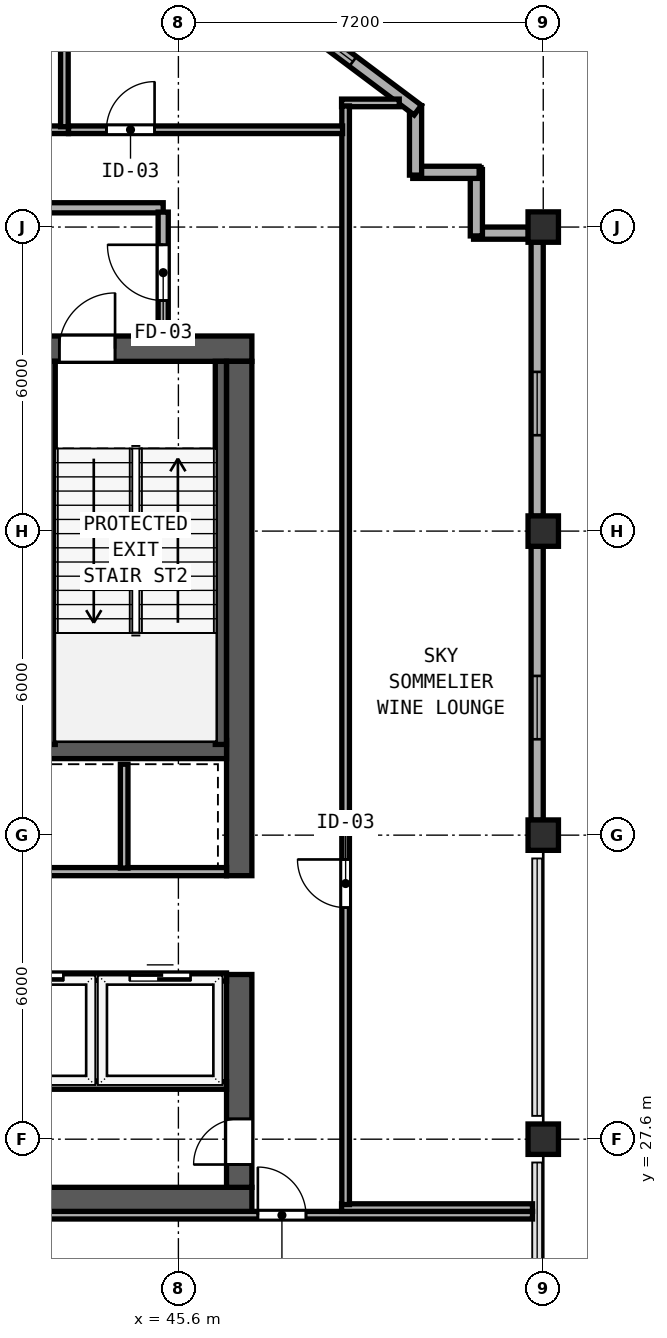
"""IFC4 building model, lengths in metres.
Left out: names, types, materials, properties, quantities, classifications, styles, units other than length and angle.
Written with IfcOpenShell. Run it as: python <this file> out.ifc"""

import sys

from ifc_helpers import new_model, si_unit, direction, frame, frame_2d, origin, origin_2d, place, context, subcontext, project, spatial, rectangle, hollow_rectangle, extrude, element, fill, save


model = new_model("IFC4")
c1 = context("Model", 3, precision=1e-05, world=origin(), true_north=direction((0.0, 1.0)))
c2 = subcontext(c1, "Body", "Model", "MODEL_VIEW")
j1 = project(units=[si_unit("LENGTHUNIT", "METRE"), si_unit("PLANEANGLEUNIT", "RADIAN")], contexts=[c1])
p1 = place(None, origin())
s1 = spatial("IfcSite", under=j1, at=p1, CompositionType="ELEMENT")
p2 = place(p1, origin())
s2 = spatial("IfcBuilding", under=s1, at=p2, CompositionType="ELEMENT")
p3 = place(p2, frame((0.0, 0.0, 313.4)))
s3 = spatial("IfcBuildingStorey", under=s2, at=p3, CompositionType="ELEMENT", Elevation=313.4)
p4 = place(p3, frame((29.75, 26.4, 0.0), z_axis=(0.0, 0.0, 1.0), x_axis=(1.0, 0.0, 0.0)))
e1 = element("IfcWall", 1, at=p4, inside=s3, PredefinedType="SHEAR", context=c2, shape_type="SweptSolid", body=[
    extrude(rectangle(XDim=17.3, YDim=0.5, at=frame_2d((8.65, 0.0))), origin(), (0.0, 0.0, 1.0), 4.56),
])
p5 = place(p3, frame((29.75, 43.2, 0.0), z_axis=(0.0, 0.0, 1.0), x_axis=(1.0, 0.0, 0.0)))
e2 = element("IfcWall", 2, at=p5, inside=s3, PredefinedType="SHEAR", context=c2, shape_type="SweptSolid", body=[
    extrude(rectangle(XDim=17.3, YDim=0.5, at=frame_2d((8.65, 0.0))), origin(), (0.0, 0.0, 1.0), 4.56),
])
p6 = place(p5, frame((2.3, 0.0, 0.0)))
e3 = element("IfcOpeningElement", 3, at=p6, cuts=e2, PredefinedType="OPENING", context=c2, shape_type="SweptSolid", body=[
    extrude(rectangle(XDim=1.1, YDim=2.15, at=frame_2d((0.55, 1.075))), frame((0.0, 0.26, 0.0), z_axis=(0.0, -1.0, 0.0), x_axis=(1.0, 0.0, 0.0)), (0.0, 0.0, 1.0), 0.52),
])
p7 = place(p5, frame((7.41, 0.0, 0.0)))
e4 = element("IfcOpeningElement", 4, at=p7, cuts=e2, PredefinedType="OPENING", context=c2, shape_type="SweptSolid", body=[
    extrude(rectangle(XDim=1.1, YDim=2.15, at=frame_2d((0.55, 1.075))), frame((0.0, 0.26, 0.0), z_axis=(0.0, -1.0, 0.0), x_axis=(1.0, 0.0, 0.0)), (0.0, 0.0, 1.0), 0.52),
])
p8 = place(p5, frame((13.5, 0.0, 0.0)))
e5 = element("IfcOpeningElement", 5, at=p8, cuts=e2, PredefinedType="OPENING", context=c2, shape_type="SweptSolid", body=[
    extrude(rectangle(XDim=1.1, YDim=2.15, at=frame_2d((0.55, 1.075))), frame((0.0, 0.26, 0.0), z_axis=(0.0, -1.0, 0.0), x_axis=(1.0, 0.0, 0.0)), (0.0, 0.0, 1.0), 0.52),
])
p9 = place(p5, frame((4.63, 0.0, 0.0)))
e6 = element("IfcOpeningElement", 6, at=p9, cuts=e2, PredefinedType="OPENING", context=c2, shape_type="SweptSolid", body=[
    extrude(rectangle(XDim=1.1, YDim=2.2, at=frame_2d((0.55, 1.1))), frame((0.0, 0.26, 0.0), z_axis=(0.0, -1.0, 0.0), x_axis=(1.0, 0.0, 0.0)), (0.0, 0.0, 1.0), 0.52),
])
p10 = place(p5, frame((10.99, 0.0, 0.0)))
e7 = element("IfcOpeningElement", 7, at=p10, cuts=e2, PredefinedType="OPENING", context=c2, shape_type="SweptSolid", body=[
    extrude(rectangle(XDim=1.1, YDim=2.2, at=frame_2d((0.55, 1.1))), frame((0.0, 0.26, 0.0), z_axis=(0.0, -1.0, 0.0), x_axis=(1.0, 0.0, 0.0)), (0.0, 0.0, 1.0), 0.52),
])
p11 = place(p3, frame((46.8, 26.65, 0.0), z_axis=(0.0, 0.0, 1.0), x_axis=(0.0, 1.0, 0.0)))
e8 = element("IfcWall", 8, at=p11, inside=s3, PredefinedType="SHEAR", context=c2, shape_type="SweptSolid", body=[
    extrude(rectangle(XDim=4.2, YDim=0.5, at=frame_2d((2.1, 0.0))), origin(), (0.0, 0.0, 1.0), 4.56),
])
p12 = place(p11, frame((1.35, 0.0, 0.0), z_axis=(0.0, 0.0, 1.0), x_axis=(-1.0, 0.0, 0.0)))
e9 = element("IfcOpeningElement", 9, at=p12, cuts=e8, PredefinedType="OPENING", context=c2, shape_type="SweptSolid", body=[
    extrude(rectangle(XDim=0.9, YDim=2.1, at=frame_2d((0.45, 1.05))), frame((0.0, 0.26, 0.0), z_axis=(0.0, -1.0, 0.0), x_axis=(1.0, 0.0, 0.0)), (0.0, 0.0, 1.0), 0.52),
])
p13 = place(p3, frame((46.8, 32.8, 0.0), z_axis=(0.0, 0.0, 1.0), x_axis=(0.0, 1.0, 0.0)))
e10 = element("IfcWall", 10, at=p13, inside=s3, PredefinedType="SHEAR", context=c2, shape_type="SweptSolid", body=[
    extrude(rectangle(XDim=10.15, YDim=0.5, at=frame_2d((5.075, 0.0))), origin(), (0.0, 0.0, 1.0), 4.56),
])
p14 = place(p3, frame((30.25, 35.29, 0.0), z_axis=(0.0, 0.0, 1.0), x_axis=(1.0, 0.0, 0.0)))
e11 = element("IfcWall", 11, at=p14, inside=s3, PredefinedType="SHEAR", context=c2, shape_type="SweptSolid", body=[
    extrude(rectangle(XDim=16.3, YDim=0.36, at=frame_2d((8.15, 0.0))), origin(), (0.0, 0.0, 1.0), 4.56),
])
p15 = place(p14, frame((5.1, 0.0, 0.0), z_axis=(0.0, 0.0, 1.0), x_axis=(-1.0, 0.0, 0.0)))
e12 = element("IfcOpeningElement", 12, at=p15, cuts=e11, PredefinedType="OPENING", context=c2, shape_type="SweptSolid", body=[
    extrude(rectangle(XDim=0.9, YDim=2.1, at=frame_2d((0.45, 1.05))), frame((0.0, 0.19, 0.0), z_axis=(0.0, -1.0, 0.0), x_axis=(1.0, 0.0, 0.0)), (0.0, 0.0, 1.0), 0.38),
])
p16 = place(p14, frame((12.16, 0.0, 0.0), z_axis=(0.0, 0.0, 1.0), x_axis=(-1.0, 0.0, 0.0)))
e13 = element("IfcOpeningElement", 13, at=p16, cuts=e11, PredefinedType="OPENING", context=c2, shape_type="SweptSolid", body=[
    extrude(rectangle(XDim=0.9, YDim=2.1, at=frame_2d((0.45, 1.05))), frame((0.0, 0.19, 0.0), z_axis=(0.0, -1.0, 0.0), x_axis=(1.0, 0.0, 0.0)), (0.0, 0.0, 1.0), 0.38),
])
for number, where, z_axis, x_axis in (
    (14, (43.06, 35.39, 0.0), (0.0, 0.0, 1.0), (0.0, 1.0, 0.0)),
    (15, (46.438, 35.39, 0.0), (0.0, 0.0, 1.0), (0.0, 1.0, 0.0)),
):
    element("IfcWall", number, at=place(p3, frame(where, z_axis=z_axis, x_axis=x_axis)), inside=s3, PredefinedType="SHEAR", context=c2, shape_type="SweptSolid", body=[
        extrude(rectangle(XDim=7.56, YDim=0.22, at=frame_2d((3.78, 0.0))), origin(), (0.0, 0.0, 1.0), 4.56),
    ])
for number, where, z_axis, x_axis in (
    (16, (52.8, 33.6, 0.0), (0.0, 0.0, 1.0), (1.0, 0.0, 0.0)),
    (17, (52.8, 45.6, 0.0), (0.0, 0.0, 1.0), (1.0, 0.0, 0.0)),
    (18, (52.8, 27.6, 0.0), (0.0, 0.0, 1.0), (1.0, 0.0, 0.0)),
    (19, (52.8, 39.6, 0.0), (0.0, 0.0, 1.0), (1.0, 0.0, 0.0)),
):
    element("IfcColumn", number, at=place(p3, frame(where, z_axis=z_axis, x_axis=x_axis)), inside=s3, PredefinedType="COLUMN", context=c2, shape_type="SweptSolid", body=[
        extrude(hollow_rectangle(XDim=0.6, YDim=0.6, WallThickness=0.024, at=origin_2d()), origin(), (0.0, 0.0, 1.0), 4.8),
    ])
p17 = place(p3, frame((52.68, 33.892, 0.0), z_axis=(0.0, 0.0, 1.0), x_axis=(0.0, 1.0, 0.0)))
e20 = element("IfcWall", 20, at=p17, inside=s3, PredefinedType="SOLIDWALL", context=c2, shape_type="SweptSolid", body=[
    extrude(rectangle(XDim=5.416, YDim=0.24, at=frame_2d((2.708, 0.0))), origin(), (0.0, 0.0, 1.0), 4.155),
])
p18 = place(p17, frame((1.6, 0.0, 0.85)))
e21 = element("IfcOpeningElement", 21, at=p18, cuts=e20, PredefinedType="OPENING", context=c2, shape_type="SweptSolid", body=[
    extrude(rectangle(XDim=1.25, YDim=1.95, at=frame_2d((0.625, 0.975))), frame((0.0, 0.13, 0.0), z_axis=(0.0, -1.0, 0.0), x_axis=(1.0, 0.0, 0.0)), (0.0, 0.0, 1.0), 0.26),
])
p19 = place(p3, frame((52.68, 39.892, 0.0), z_axis=(0.0, 0.0, 1.0), x_axis=(0.0, 1.0, 0.0)))
e22 = element("IfcWall", 22, at=p19, inside=s3, PredefinedType="SOLIDWALL", context=c2, shape_type="SweptSolid", body=[
    extrude(rectangle(XDim=5.416, YDim=0.24, at=frame_2d((2.708, 0.0))), origin(), (0.0, 0.0, 1.0), 4.155),
])
p20 = place(p19, frame((1.6, 0.0, 0.85)))
e23 = element("IfcOpeningElement", 23, at=p20, cuts=e22, PredefinedType="OPENING", context=c2, shape_type="SweptSolid", body=[
    extrude(rectangle(XDim=1.25, YDim=1.95, at=frame_2d((0.625, 0.975))), frame((0.0, 0.13, 0.0), z_axis=(0.0, -1.0, 0.0), x_axis=(1.0, 0.0, 0.0)), (0.0, 0.0, 1.0), 0.26),
])
p21 = place(p3, frame((52.508, 45.48, 0.0), z_axis=(0.0, 0.0, 1.0), x_axis=(-1.0, 0.0, 0.0)))
e24 = element("IfcWall", 24, at=p21, inside=s3, PredefinedType="SOLIDWALL", context=c2, shape_type="SweptSolid", body=[
    extrude(rectangle(XDim=1.083, YDim=0.24, at=frame_2d((0.542, 0.0))), origin(), (0.0, 0.0, 1.0), 4.56),
])
p22 = place(p3, frame((51.48, 45.425, 0.0), z_axis=(0.0, 0.0, 1.0), x_axis=(0.0, 1.0, 0.0)))
e25 = element("IfcWall", 25, at=p22, inside=s3, PredefinedType="SOLIDWALL", context=c2, shape_type="SweptSolid", body=[
    extrude(rectangle(XDim=1.31, YDim=0.24, at=frame_2d((0.655, 0.0))), origin(), (0.0, 0.0, 1.0), 4.56),
])
p23 = place(p3, frame((51.535, 46.68, 0.0), z_axis=(0.0, 0.0, 1.0), x_axis=(-1.0, 0.0, 0.0)))
e26 = element("IfcWall", 26, at=p23, inside=s3, PredefinedType="SOLIDWALL", context=c2, shape_type="SweptSolid", body=[
    extrude(rectangle(XDim=1.31, YDim=0.24, at=frame_2d((0.655, 0.0))), origin(), (0.0, 0.0, 1.0), 4.56),
])
p24 = place(p3, frame((50.28, 46.625, 0.0), z_axis=(0.0, 0.0, 1.0), x_axis=(0.0, 1.0, 0.0)))
e27 = element("IfcWall", 27, at=p24, inside=s3, PredefinedType="SOLIDWALL", context=c2, shape_type="SweptSolid", body=[
    extrude(rectangle(XDim=1.37, YDim=0.24, at=frame_2d((0.685, 0.0))), origin(), (0.0, 0.0, 1.0), 4.56),
])
p25 = place(p3, frame((50.324, 47.907, 0.0), z_axis=(0.0, 0.0, 1.0), x_axis=(-0.80001459783, 0.599980535734, 0.0)))
e28 = element("IfcWall", 28, at=p25, inside=s3, PredefinedType="SOLIDWALL", context=c2, shape_type="SweptSolid", body=[
    extrude(rectangle(XDim=6.021, YDim=0.24, at=frame_2d((3.01, 0.0))), origin(), (0.0, 0.0, 1.0), 4.56),
])
p26 = place(p25, frame((1.6, 0.0, 0.85)))
e29 = element("IfcOpeningElement", 29, at=p26, cuts=e28, PredefinedType="OPENING", context=c2, shape_type="SweptSolid", body=[
    extrude(rectangle(XDim=1.25, YDim=1.95, at=frame_2d((0.625, 0.975))), frame((0.0, 0.13, 0.0), z_axis=(0.0, -1.0, 0.0), x_axis=(1.0, 0.0, 0.0)), (0.0, 0.0, 1.0), 0.26),
])
p27 = place(p3, frame((31.5, 45.98, 0.0), z_axis=(0.0, 0.0, 1.0), x_axis=(1.0, 0.0, 0.0)))
e30 = element("IfcWall", 30, at=p27, inside=s3, PredefinedType="SOLIDWALL", context=c2, shape_type="SweptSolid", body=[
    extrude(rectangle(XDim=13.8, YDim=0.2, at=frame_2d((6.9, 0.0))), origin(), (0.0, 0.0, 1.0), 4.56),
])
p28 = place(p3, frame((45.3, 43.45, 0.0), z_axis=(0.0, 0.0, 1.0), x_axis=(0.0, 1.0, 0.0)))
e31 = element("IfcWall", 31, at=p28, inside=s3, PredefinedType="SOLIDWALL", context=c2, shape_type="SweptSolid", body=[
    extrude(rectangle(XDim=2.445, YDim=0.2, at=frame_2d((1.223, 0.0))), origin(), (0.0, 0.0, 1.0), 4.56),
])
p29 = place(p28, frame((0.7, 0.0, 0.0)))
e32 = element("IfcOpeningElement", 32, at=p29, cuts=e31, PredefinedType="OPENING", context=c2, shape_type="SweptSolid", body=[
    extrude(rectangle(XDim=1.1, YDim=2.15, at=frame_2d((0.55, 1.075))), frame((0.0, 0.11, 0.0), z_axis=(0.0, -1.0, 0.0), x_axis=(1.0, 0.0, 0.0)), (0.0, 0.0, 1.0), 0.22),
])
p30 = place(p3, frame((42.63, 32.88, 0.0), z_axis=(0.0, 0.0, 1.0), x_axis=(1.0, 0.0, 0.0)))
e33 = element("IfcWall", 33, at=p30, inside=s3, PredefinedType="SOLIDWALL", context=c2, shape_type="SweptSolid", body=[
    extrude(rectangle(XDim=3.92, YDim=0.16, at=frame_2d((1.96, 0.0))), origin(), (0.0, 0.0, 1.0), 4.56),
])
p31 = place(p3, frame((44.53, 32.95, 0.0), z_axis=(0.0, 0.0, 1.0), x_axis=(0.0, 1.0, 0.0)))
e34 = element("IfcWall", 34, at=p31, inside=s3, PredefinedType="SOLIDWALL", context=c2, shape_type="SweptSolid", body=[
    extrude(rectangle(XDim=2.05, YDim=0.15, at=frame_2d((1.025, 0.0))), origin(), (0.0, 0.0, 1.0), 4.56),
])
p32 = place(p3, frame((30.25, 30.8, 0.0), z_axis=(0.0, 0.0, 1.0), x_axis=(1.0, 0.0, 0.0)))
e35 = element("IfcWall", 35, at=p32, inside=s3, PredefinedType="SOLIDWALL", context=c2, shape_type="SweptSolid", body=[
    extrude(rectangle(XDim=16.3, YDim=0.16, at=frame_2d((8.15, 0.0))), origin(), (0.0, 0.0, 1.0), 4.56),
])
p33 = place(p32, frame((0.9, 0.0, 0.0)))
e36 = element("IfcOpeningElement", 36, at=p33, cuts=e35, PredefinedType="OPENING", context=c2, shape_type="SweptSolid", body=[
    extrude(rectangle(XDim=0.95, YDim=2.12, at=frame_2d((0.475, 1.06))), frame((0.0, 0.09, 0.0), z_axis=(0.0, -1.0, 0.0), x_axis=(1.0, 0.0, 0.0)), (0.0, 0.0, 1.0), 0.18),
])
p34 = place(p32, frame((3.85, 0.0, 0.0)))
e37 = element("IfcOpeningElement", 37, at=p34, cuts=e35, PredefinedType="OPENING", context=c2, shape_type="SweptSolid", body=[
    extrude(rectangle(XDim=0.95, YDim=2.12, at=frame_2d((0.475, 1.06))), frame((0.0, 0.09, 0.0), z_axis=(0.0, -1.0, 0.0), x_axis=(1.0, 0.0, 0.0)), (0.0, 0.0, 1.0), 0.18),
])
p35 = place(p32, frame((9.37, 0.0, 0.0)))
e38 = element("IfcOpeningElement", 38, at=p35, cuts=e35, PredefinedType="OPENING", context=c2, shape_type="SweptSolid", body=[
    extrude(rectangle(XDim=1.2, YDim=2.2, at=frame_2d((0.6, 1.1))), frame((0.0, 0.09, 0.0), z_axis=(0.0, -1.0, 0.0), x_axis=(1.0, 0.0, 0.0)), (0.0, 0.0, 1.0), 0.18),
])
p36 = place(p32, frame((11.88, 0.0, 0.0)))
e39 = element("IfcOpeningElement", 39, at=p36, cuts=e35, PredefinedType="OPENING", context=c2, shape_type="SweptSolid", body=[
    extrude(rectangle(XDim=1.2, YDim=2.2, at=frame_2d((0.6, 1.1))), frame((0.0, 0.09, 0.0), z_axis=(0.0, -1.0, 0.0), x_axis=(1.0, 0.0, 0.0)), (0.0, 0.0, 1.0), 0.18),
])
p37 = place(p32, frame((14.39, 0.0, 0.0)))
e40 = element("IfcOpeningElement", 40, at=p37, cuts=e35, PredefinedType="OPENING", context=c2, shape_type="SweptSolid", body=[
    extrude(rectangle(XDim=1.2, YDim=2.2, at=frame_2d((0.6, 1.1))), frame((0.0, 0.09, 0.0), z_axis=(0.0, -1.0, 0.0), x_axis=(1.0, 0.0, 0.0)), (0.0, 0.0, 1.0), 0.18),
])
p38 = place(p3, frame((38.86, 28.66, 0.0), z_axis=(0.0, 0.0, 1.0), x_axis=(1.0, 0.0, 0.0)))
e41 = element("IfcWall", 41, at=p38, inside=s3, PredefinedType="PARTITIONING", context=c2, shape_type="SweptSolid", body=[
    extrude(rectangle(XDim=7.69, YDim=0.15, at=frame_2d((3.845, 0.0))), origin(), (0.0, 0.0, 1.0), 4.56),
])
p39 = place(p3, frame((43.98, 28.75, 0.0), z_axis=(0.0, 0.0, 1.0), x_axis=(0.0, 1.0, 0.0)))
e42 = element("IfcWall", 42, at=p39, inside=s3, PredefinedType="SOLIDWALL", context=c2, shape_type="SweptSolid", body=[
    extrude(rectangle(XDim=1.985, YDim=0.15, at=frame_2d((0.993, 0.0))), origin(), (0.0, 0.0, 1.0), 4.56),
])
p40 = place(p3, frame((40.682, 47.52, 0.0), z_axis=(0.0, 0.0, 1.0), x_axis=(1.0, 0.0, 0.0)))
e43 = element("IfcWall", 43, at=p40, inside=s3, PredefinedType="PARTITIONING", context=c2, shape_type="SweptSolid", body=[
    extrude(rectangle(XDim=2.748, YDim=0.15, at=frame_2d((1.374, 0.0))), origin(), (0.0, 0.0, 1.0), 4.56),
])
p41 = place(p40, frame((0.688, 0.0, 0.0)))
e44 = element("IfcOpeningElement", 44, at=p41, cuts=e43, PredefinedType="OPENING", context=c2, shape_type="SweptSolid", body=[
    extrude(rectangle(XDim=0.95, YDim=2.12, at=frame_2d((0.475, 1.06))), frame((0.0, 0.085, 0.0), z_axis=(0.0, -1.0, 0.0), x_axis=(1.0, 0.0, 0.0)), (0.0, 0.0, 1.0), 0.17),
])
p42 = place(p3, frame((43.35, 47.58, 0.0), z_axis=(0.0, 0.0, 1.0), x_axis=(0.0, 1.0, 0.0)))
e45 = element("IfcWall", 45, at=p42, inside=s3, PredefinedType="PARTITIONING", context=c2, shape_type="SweptSolid", body=[
    extrude(rectangle(XDim=4.167, YDim=0.15, at=frame_2d((2.083, 0.0))), origin(), (0.0, 0.0, 1.0), 4.56),
])
p43 = place(p3, frame((41.082, 26.1, 0.0), z_axis=(0.0, 0.0, 1.0), x_axis=(1.0, 0.0, 0.0)))
e46 = element("IfcWall", 46, at=p43, inside=s3, PredefinedType="PARTITIONING", context=c2, shape_type="SweptSolid", body=[
    extrude(rectangle(XDim=11.506, YDim=0.15, at=frame_2d((5.753, 0.0))), origin(), (0.0, 0.0, 1.0), 4.56),
])
p44 = place(p43, frame((7.036, 0.0, 0.0), z_axis=(0.0, 0.0, 1.0), x_axis=(-1.0, 0.0, 0.0)))
e47 = element("IfcOpeningElement", 47, at=p44, cuts=e46, PredefinedType="OPENING", context=c2, shape_type="SweptSolid", body=[
    extrude(rectangle(XDim=0.95, YDim=2.12, at=frame_2d((0.475, 1.06))), frame((0.0, 0.085, 0.0), z_axis=(0.0, -1.0, 0.0), x_axis=(1.0, 0.0, 0.0)), (0.0, 0.0, 1.0), 0.17),
])
p45 = place(p3, frame((48.82, 48.05, 0.0), z_axis=(0.0, 0.0, 1.0), x_axis=(1.0, 0.0, 0.0)))
e48 = element("IfcWall", 48, at=p45, inside=s3, PredefinedType="PARTITIONING", context=c2, shape_type="SweptSolid", body=[
    extrude(rectangle(XDim=1.138, YDim=0.15, at=frame_2d((0.569, 0.0))), origin(), (0.0, 0.0, 1.0), 4.56),
])
p46 = place(p3, frame((48.82, 26.25, 0.0), z_axis=(0.0, 0.0, 1.0), x_axis=(1.0, 0.0, 0.0)))
e49 = element("IfcWall", 49, at=p46, inside=s3, PredefinedType="PARTITIONING", context=c2, shape_type="SweptSolid", body=[
    extrude(rectangle(XDim=3.768, YDim=0.15, at=frame_2d((1.884, 0.0))), origin(), (0.0, 0.0, 1.0), 4.56),
])
p47 = place(p3, frame((48.9, 26.31, 0.0), z_axis=(0.0, 0.0, 1.0), x_axis=(0.0, 1.0, 0.0)))
e50 = element("IfcWall", 50, at=p47, inside=s3, PredefinedType="PARTITIONING", context=c2, shape_type="SweptSolid", body=[
    extrude(rectangle(XDim=21.68, YDim=0.15, at=frame_2d((10.84, 0.0))), origin(), (0.0, 0.0, 1.0), 4.56),
])
p48 = place(p47, frame((5.86, 0.0, 0.0)))
e51 = element("IfcOpeningElement", 51, at=p48, cuts=e50, PredefinedType="OPENING", context=c2, shape_type="SweptSolid", body=[
    extrude(rectangle(XDim=0.95, YDim=2.12, at=frame_2d((0.475, 1.06))), frame((0.0, 0.085, 0.0), z_axis=(0.0, -1.0, 0.0), x_axis=(1.0, 0.0, 0.0)), (0.0, 0.0, 1.0), 0.17),
])
p49 = place(p3, frame((43.432, 47.52, 0.0), z_axis=(0.0, 0.0, 1.0), x_axis=(1.0, 0.0, 0.0)))
e52 = element("IfcWall", 52, at=p49, inside=s3, PredefinedType="PARTITIONING", context=c2, shape_type="SweptSolid", body=[
    extrude(rectangle(XDim=5.408, YDim=0.15, at=frame_2d((2.704, 0.0))), origin(), (0.0, 0.0, 1.0), 4.56),
])
p50 = place(p49, frame((0.748, 0.0, 0.0)))
e53 = element("IfcOpeningElement", 53, at=p50, cuts=e52, PredefinedType="OPENING", context=c2, shape_type="SweptSolid", body=[
    extrude(rectangle(XDim=0.95, YDim=2.12, at=frame_2d((0.475, 1.06))), frame((0.0, 0.085, 0.0), z_axis=(0.0, -1.0, 0.0), x_axis=(1.0, 0.0, 0.0)), (0.0, 0.0, 1.0), 0.17),
])
p51 = place(p18, origin())
e54 = element("IfcWindow", 54, at=p51, inside=s3, PartitioningType="SINGLE_PANEL", PredefinedType="WINDOW", context=c2, shape_type="SweptSolid", body=[
    extrude(rectangle(XDim=1.25, YDim=1.95, at=frame_2d((0.625, 0.975))), frame((0.0, 0.03, 0.0), z_axis=(0.0, -1.0, 0.0), x_axis=(1.0, 0.0, 0.0)), (0.0, 0.0, 1.0), 0.06),
])
fill(e21, e54)
p52 = place(p20, origin())
e55 = element("IfcWindow", 55, at=p52, inside=s3, PartitioningType="SINGLE_PANEL", PredefinedType="WINDOW", context=c2, shape_type="SweptSolid", body=[
    extrude(rectangle(XDim=1.25, YDim=1.95, at=frame_2d((0.625, 0.975))), frame((0.0, 0.03, 0.0), z_axis=(0.0, -1.0, 0.0), x_axis=(1.0, 0.0, 0.0)), (0.0, 0.0, 1.0), 0.06),
])
fill(e23, e55)
p53 = place(p26, origin())
e56 = element("IfcWindow", 56, at=p53, inside=s3, PartitioningType="SINGLE_PANEL", PredefinedType="WINDOW", context=c2, shape_type="SweptSolid", body=[
    extrude(rectangle(XDim=1.25, YDim=1.95, at=frame_2d((0.625, 0.975))), frame((0.0, 0.03, 0.0), z_axis=(0.0, -1.0, 0.0), x_axis=(1.0, 0.0, 0.0)), (0.0, 0.0, 1.0), 0.06),
])
fill(e29, e56)
p54 = place(p8, origin())
e57 = element("IfcDoor", 57, at=p54, inside=s3, OperationType="SINGLE_SWING_RIGHT", PredefinedType="DOOR", context=c2, shape_type="SweptSolid", body=[
    extrude(rectangle(XDim=1.1, YDim=2.15, at=frame_2d((0.55, 1.075))), frame((0.0, 0.185, 0.0), z_axis=(0.0, -1.0, 0.0), x_axis=(1.0, 0.0, 0.0)), (0.0, 0.0, 1.0), 0.05),
])
fill(e5, e57)
p55 = place(p29, origin())
e58 = element("IfcDoor", 58, at=p55, inside=s3, OperationType="SINGLE_SWING_RIGHT", PredefinedType="DOOR", context=c2, shape_type="SweptSolid", body=[
    extrude(rectangle(XDim=1.1, YDim=2.15, at=frame_2d((0.55, 1.075))), frame((0.0, 0.025, 0.0), z_axis=(0.0, -1.0, 0.0), x_axis=(1.0, 0.0, 0.0)), (0.0, 0.0, 1.0), 0.05),
])
fill(e32, e58)
p56 = place(p12, origin())
e59 = element("IfcDoor", 59, at=p56, inside=s3, OperationType="SINGLE_SWING_RIGHT", PredefinedType="DOOR", context=c2, shape_type="SweptSolid", body=[
    extrude(rectangle(XDim=0.9, YDim=2.1, at=frame_2d((0.45, 1.05))), frame((0.0, -0.135, 0.0), z_axis=(0.0, -1.0, 0.0), x_axis=(1.0, 0.0, 0.0)), (0.0, 0.0, 1.0), 0.05),
])
fill(e9, e59)
p57 = place(p36, origin())
e60 = element("IfcDoor", 60, at=p57, inside=s3, OperationType="SLIDING_TO_RIGHT", PredefinedType="DOOR", context=c2, shape_type="SweptSolid", body=[
    extrude(rectangle(XDim=1.2, YDim=2.2, at=frame_2d((0.6, 1.1))), frame((0.0, 0.025, 0.0), z_axis=(0.0, -1.0, 0.0), x_axis=(1.0, 0.0, 0.0)), (0.0, 0.0, 1.0), 0.05),
])
fill(e39, e60)
p58 = place(p37, origin())
e61 = element("IfcDoor", 61, at=p58, inside=s3, OperationType="SLIDING_TO_RIGHT", PredefinedType="DOOR", context=c2, shape_type="SweptSolid", body=[
    extrude(rectangle(XDim=1.2, YDim=2.2, at=frame_2d((0.6, 1.1))), frame((0.0, 0.025, 0.0), z_axis=(0.0, -1.0, 0.0), x_axis=(1.0, 0.0, 0.0)), (0.0, 0.0, 1.0), 0.05),
])
fill(e40, e61)
p59 = place(p44, origin())
e62 = element("IfcDoor", 62, at=p59, inside=s3, OperationType="SINGLE_SWING_RIGHT", PredefinedType="DOOR", context=c2, shape_type="SweptSolid", body=[
    extrude(rectangle(XDim=0.95, YDim=2.12, at=frame_2d((0.475, 1.06))), frame((0.0, 0.025, 0.0), z_axis=(0.0, -1.0, 0.0), x_axis=(1.0, 0.0, 0.0)), (0.0, 0.0, 1.0), 0.05),
])
fill(e47, e62)
p60 = place(p48, origin())
e63 = element("IfcDoor", 63, at=p60, inside=s3, OperationType="SINGLE_SWING_RIGHT", PredefinedType="DOOR", context=c2, shape_type="SweptSolid", body=[
    extrude(rectangle(XDim=0.95, YDim=2.12, at=frame_2d((0.475, 1.06))), frame((0.0, 0.025, 0.0), z_axis=(0.0, -1.0, 0.0), x_axis=(1.0, 0.0, 0.0)), (0.0, 0.0, 1.0), 0.05),
])
fill(e51, e63)
p61 = place(p50, origin())
e64 = element("IfcDoor", 64, at=p61, inside=s3, OperationType="SINGLE_SWING_RIGHT", PredefinedType="DOOR", context=c2, shape_type="SweptSolid", body=[
    extrude(rectangle(XDim=0.95, YDim=2.12, at=frame_2d((0.475, 1.06))), frame((0.0, 0.025, 0.0), z_axis=(0.0, -1.0, 0.0), x_axis=(1.0, 0.0, 0.0)), (0.0, 0.0, 1.0), 0.05),
])
fill(e53, e64)
save(model, sys.argv[1])
